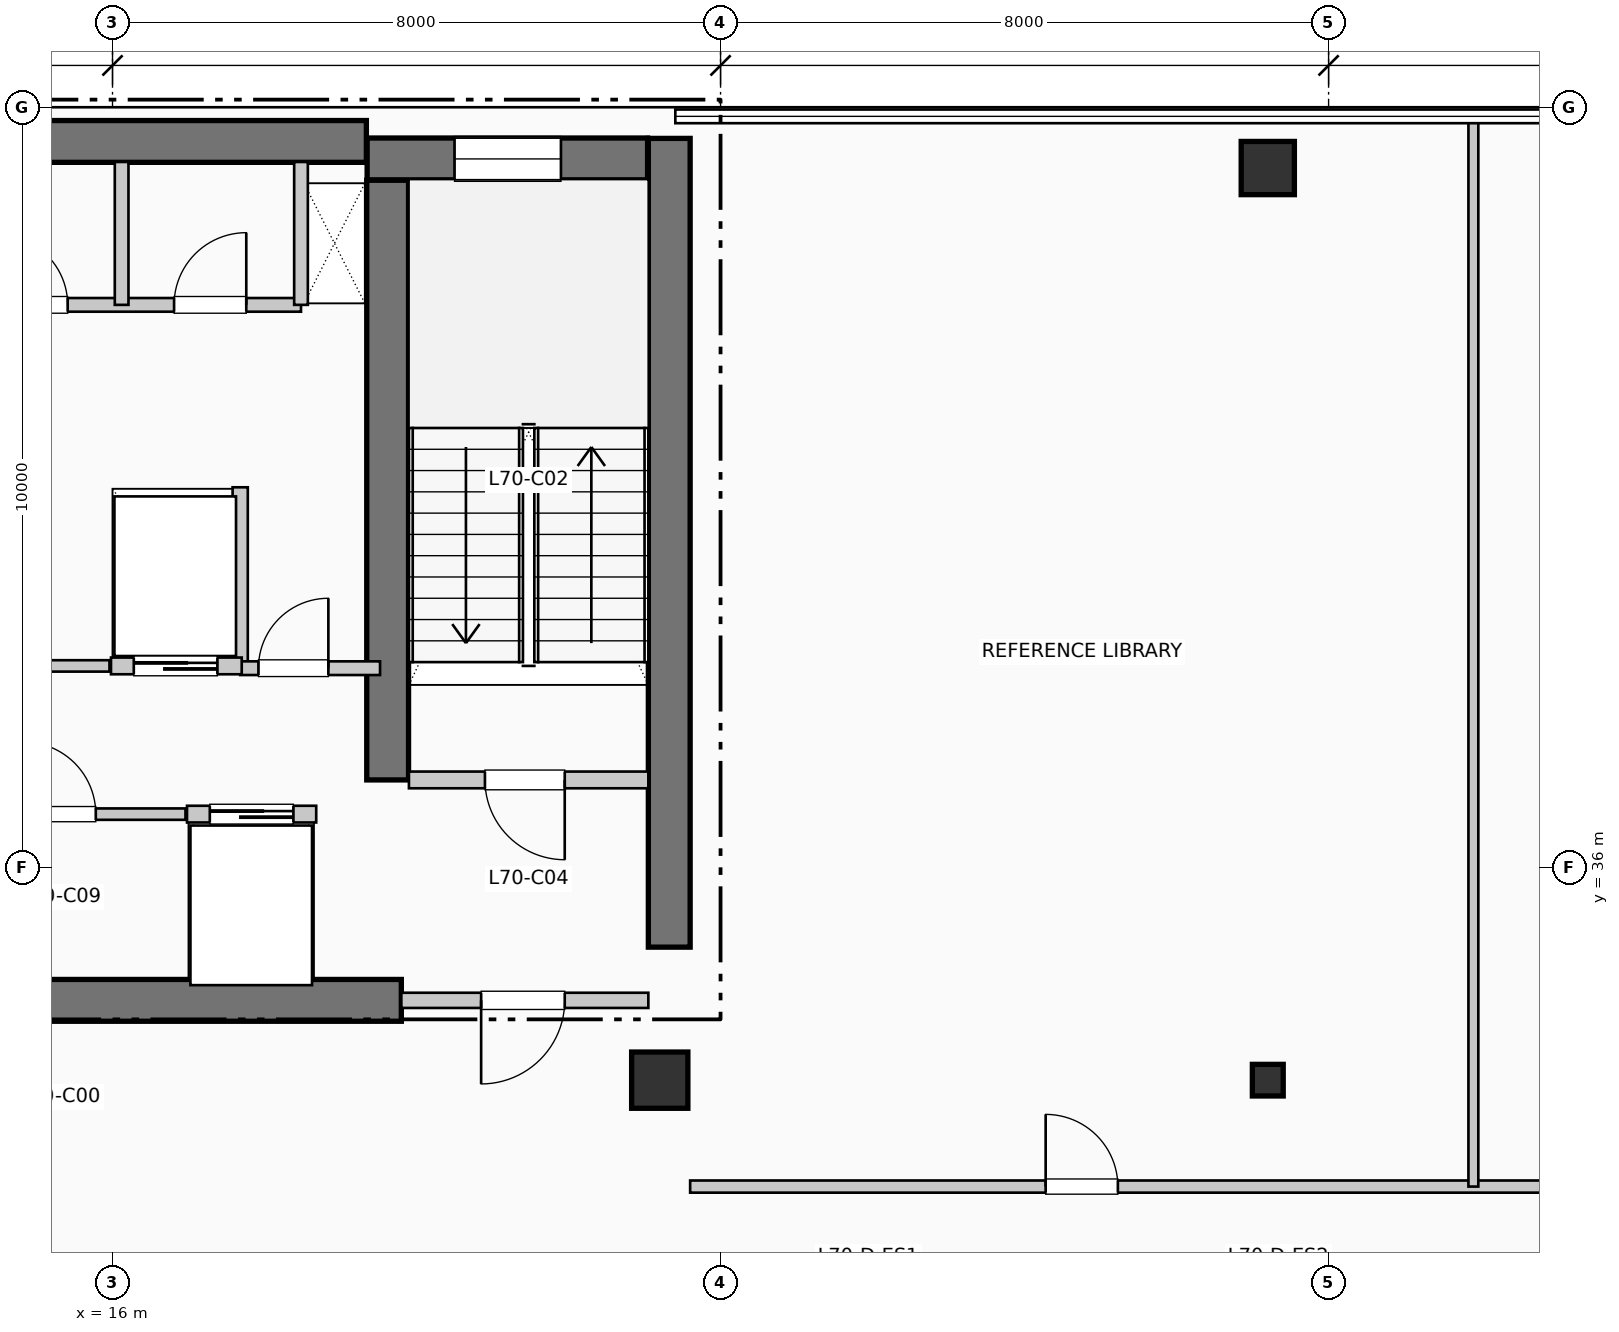
"""IFC4 building model, lengths in metres.
Left out: names, types, materials, properties, quantities, classifications, styles, units other than length and angle.
Written with IfcOpenShell. Run it as: python <this file> out.ifc"""

import sys

from ifc_helpers import new_model, si_unit, direction, frame, frame_2d, origin, origin_2d, place, context, subcontext, project, spatial, rectangle, i_section, extrude, element, fill, save


model = new_model("IFC4")
c1 = context("Model", 3, precision=1e-05, world=origin(), true_north=direction((0.0, 1.0)))
c2 = subcontext(c1, "Body", "Model", "MODEL_VIEW")
j1 = project(units=[si_unit("LENGTHUNIT", "METRE"), si_unit("PLANEANGLEUNIT", "RADIAN")], contexts=[c1])
p1 = place(None, origin())
s1 = spatial("IfcSite", under=j1, at=p1, CompositionType="ELEMENT")
p2 = place(p1, origin())
s2 = spatial("IfcBuilding", under=s1, at=p2, CompositionType="ELEMENT")
p3 = place(p2, frame((0.0, 0.0, 288.09)))
s3 = spatial("IfcBuildingStorey", under=s2, at=p3, CompositionType="ELEMENT", Elevation=288.09)
p4 = place(p3, frame((5.36, 45.55, 0.0), z_axis=(0.0, 0.0, 1.0), x_axis=(1.0, 0.0, 0.0)))
e1 = element("IfcWall", 1, at=p4, inside=s3, PredefinedType="SHEAR", context=c2, shape_type="SweptSolid", body=[
    extrude(rectangle(XDim=13.98, YDim=0.55, at=frame_2d((6.99, 0.0))), origin(), (0.0, 0.0, 1.0), 3.96),
])
p5 = place(p3, frame((23.325, 34.95, 0.0), z_axis=(0.0, 0.0, 1.0), x_axis=(0.0, 1.0, 0.0)))
e2 = element("IfcWall", 2, at=p5, inside=s3, PredefinedType="SHEAR", context=c2, shape_type="SweptSolid", body=[
    extrude(rectangle(XDim=10.64, YDim=0.55, at=frame_2d((5.32, 0.0))), origin(), (0.0, 0.0, 1.0), 3.96),
])
p6 = place(p3, frame((13.68, 34.25, 0.0), z_axis=(0.0, 0.0, 1.0), x_axis=(1.0, 0.0, 0.0)))
e3 = element("IfcWall", 3, at=p6, inside=s3, PredefinedType="SHEAR", context=c2, shape_type="SweptSolid", body=[
    extrude(rectangle(XDim=6.12, YDim=0.55, at=frame_2d((3.06, 0.0))), origin(), (0.0, 0.0, 1.0), 3.96),
])
p7 = place(p3, frame((19.62, 37.15, 0.0), z_axis=(0.0, 0.0, 1.0), x_axis=(0.0, 1.0, 0.0)))
e4 = element("IfcWall", 4, at=p7, inside=s3, PredefinedType="SHEAR", context=c2, shape_type="SweptSolid", body=[
    extrude(rectangle(XDim=7.89, YDim=0.55, at=frame_2d((3.945, 0.0))), origin(), (0.0, 0.0, 1.0), 3.96),
])
p8 = place(p3, frame((19.35, 45.32, 0.0), z_axis=(0.0, 0.0, 1.0), x_axis=(1.0, 0.0, 0.0)))
e5 = element("IfcWall", 5, at=p8, inside=s3, PredefinedType="SHEAR", context=c2, shape_type="SweptSolid", body=[
    extrude(rectangle(XDim=3.69, YDim=0.55, at=frame_2d((1.845, 0.0))), origin(), (0.0, 0.0, 1.0), 3.96),
])
p9 = place(p8, frame((1.15, 0.0, 1.05)))
e6 = element("IfcOpeningElement", 6, at=p9, cuts=e5, PredefinedType="OPENING", context=c2, shape_type="SweptSolid", body=[
    extrude(rectangle(XDim=1.4, YDim=1.8, at=frame_2d((0.7, 0.9))), frame((0.0, 0.285, 0.0), z_axis=(0.0, -1.0, 0.0), x_axis=(1.0, 0.0, 0.0)), (0.0, 0.0, 1.0), 0.57),
])
p10 = place(p3, frame((23.2, 33.2, 0.0), z_axis=(0.0, 0.0, 1.0), x_axis=(1.0, 0.0, 0.0)))
e7 = element("IfcColumn", 7, at=p10, inside=s3, PredefinedType="COLUMN", context=c2, shape_type="SweptSolid", body=[
    extrude(rectangle(XDim=0.74, YDim=0.74, at=origin_2d()), origin(), (0.0, 0.0, 1.0), 3.96),
])
p11 = place(p3, frame((31.2, 33.2, 0.0), z_axis=(0.0, 0.0, 1.0), x_axis=(1.0, 0.0, 0.0)))
e8 = element("IfcColumn", 8, at=p11, inside=s3, PredefinedType="COLUMN", context=c2, shape_type="SweptSolid", body=[
    extrude(i_section(OverallWidth=0.406, OverallDepth=0.416, WebThickness=0.022, FlangeThickness=0.036, at=origin_2d()), origin(), (0.0, 0.0, 1.0), 3.96),
])
p12 = place(p3, frame((31.2, 45.2, 0.0), z_axis=(0.0, 0.0, 1.0), x_axis=(1.0, 0.0, 0.0)))
e9 = element("IfcColumn", 9, at=p12, inside=s3, PredefinedType="COLUMN", context=c2, shape_type="SweptSolid", body=[
    extrude(rectangle(XDim=0.7, YDim=0.7, at=origin_2d()), origin(), (0.0, 0.0, 1.0), 3.96),
])
p13 = place(p3, frame((19.9, 37.15, 0.0), z_axis=(0.0, 0.0, 1.0), x_axis=(1.0, 0.0, 0.0)))
e10 = element("IfcWall", 10, at=p13, inside=s3, PredefinedType="PARTITIONING", context=c2, shape_type="SweptSolid", body=[
    extrude(rectangle(XDim=3.15, YDim=0.22, at=frame_2d((1.575, 0.0))), origin(), (0.0, 0.0, 1.0), 3.74),
])
p14 = place(p13, frame((2.05, 0.0, 0.0), z_axis=(0.0, 0.0, 1.0), x_axis=(-1.0, 0.0, 0.0)))
e11 = element("IfcOpeningElement", 11, at=p14, cuts=e10, PredefinedType="OPENING", context=c2, shape_type="SweptSolid", body=[
    extrude(rectangle(XDim=1.05, YDim=2.15, at=frame_2d((0.525, 1.075))), frame((0.0, 0.12, 0.0), z_axis=(0.0, -1.0, 0.0), x_axis=(1.0, 0.0, 0.0)), (0.0, 0.0, 1.0), 0.24),
])
p15 = place(p3, frame((19.8, 34.25, 0.0), z_axis=(0.0, 0.0, 1.0), x_axis=(1.0, 0.0, 0.0)))
e12 = element("IfcWall", 12, at=p15, inside=s3, PredefinedType="PARTITIONING", context=c2, shape_type="SweptSolid", body=[
    extrude(rectangle(XDim=3.25, YDim=0.2, at=frame_2d((1.625, 0.0))), origin(), (0.0, 0.0, 1.0), 3.74),
])
p16 = place(p15, frame((2.15, 0.0, 0.0), z_axis=(0.0, 0.0, 1.0), x_axis=(-1.0, 0.0, 0.0)))
e13 = element("IfcOpeningElement", 13, at=p16, cuts=e12, PredefinedType="OPENING", context=c2, shape_type="SweptSolid", body=[
    extrude(rectangle(XDim=1.1, YDim=2.15, at=frame_2d((0.55, 1.075))), frame((0.0, 0.11, 0.0), z_axis=(0.0, -1.0, 0.0), x_axis=(1.0, 0.0, 0.0)), (0.0, 0.0, 1.0), 0.22),
])
p17 = place(p3, frame((17.68, 38.65, 0.0), z_axis=(0.0, 0.0, 1.0), x_axis=(0.0, 1.0, 0.0)))
e14 = element("IfcWall", 14, at=p17, inside=s3, PredefinedType="PARTITIONING", context=c2, shape_type="SweptSolid", body=[
    extrude(rectangle(XDim=2.35, YDim=0.2, at=frame_2d((1.175, 0.0))), origin(), (0.0, 0.0, 1.0), 3.74),
])
p18 = place(p3, frame((17.68, 38.62, 0.0), z_axis=(0.0, 0.0, 1.0), x_axis=(1.0, 0.0, 0.0)))
e15 = element("IfcWall", 15, at=p18, inside=s3, PredefinedType="PARTITIONING", context=c2, shape_type="SweptSolid", body=[
    extrude(rectangle(XDim=1.84, YDim=0.18, at=frame_2d((0.92, 0.0))), origin(), (0.0, 0.0, 1.0), 3.74),
])
p19 = place(p18, frame((0.24, 0.0, 0.0)))
e16 = element("IfcOpeningElement", 16, at=p19, cuts=e15, PredefinedType="OPENING", context=c2, shape_type="SweptSolid", body=[
    extrude(rectangle(XDim=0.92, YDim=2.1, at=frame_2d((0.46, 1.05))), frame((0.0, 0.1, 0.0), z_axis=(0.0, -1.0, 0.0), x_axis=(1.0, 0.0, 0.0)), (0.0, 0.0, 1.0), 0.2),
])
p20 = place(p3, frame((13.68, 36.7, 0.0), z_axis=(0.0, 0.0, 1.0), x_axis=(1.0, 0.0, 0.0)))
e17 = element("IfcWall", 17, at=p20, inside=s3, PredefinedType="PARTITIONING", context=c2, shape_type="SweptSolid", body=[
    extrude(rectangle(XDim=3.28, YDim=0.15, at=frame_2d((1.64, 0.0))), origin(), (0.0, 0.0, 1.0), 3.74),
])
p21 = place(p20, frame((1.15, 0.0, 0.0)))
e18 = element("IfcOpeningElement", 18, at=p21, cuts=e17, PredefinedType="OPENING", context=c2, shape_type="SweptSolid", body=[
    extrude(rectangle(XDim=0.95, YDim=2.15, at=frame_2d((0.475, 1.075))), frame((0.0, 0.085, 0.0), z_axis=(0.0, -1.0, 0.0), x_axis=(1.0, 0.0, 0.0)), (0.0, 0.0, 1.0), 0.17),
])
p22 = place(p3, frame((12.58, 38.65, 0.0), z_axis=(0.0, 0.0, 1.0), x_axis=(1.0, 0.0, 0.0)))
e19 = element("IfcWall", 19, at=p22, inside=s3, PredefinedType="PARTITIONING", context=c2, shape_type="SweptSolid", body=[
    extrude(rectangle(XDim=3.38, YDim=0.15, at=frame_2d((1.69, 0.0))), origin(), (0.0, 0.0, 1.0), 3.74),
])
p23 = place(p22, frame((2.2, 0.0, 0.0), z_axis=(0.0, 0.0, 1.0), x_axis=(-1.0, 0.0, 0.0)))
e20 = element("IfcOpeningElement", 20, at=p23, cuts=e19, PredefinedType="OPENING", context=c2, shape_type="SweptSolid", body=[
    extrude(rectangle(XDim=1.05, YDim=2.15, at=frame_2d((0.525, 1.075))), frame((0.0, 0.085, 0.0), z_axis=(0.0, -1.0, 0.0), x_axis=(1.0, 0.0, 0.0)), (0.0, 0.0, 1.0), 0.17),
])
p24 = place(p3, frame((16.98, 36.7, 0.0), z_axis=(0.0, 0.0, 1.0), x_axis=(1.0, 0.0, 0.0)))
e21 = element("IfcWall", 21, at=p24, inside=s3, PredefinedType="PARTITIONING", context=c2, shape_type="SweptSolid", body=[
    extrude(rectangle(XDim=1.7, YDim=0.22, at=frame_2d((0.85, 0.0))), origin(), (0.0, 0.0, 1.0), 3.74),
])
p25 = place(p24, frame((0.3, 0.0, 0.0)))
e22 = element("IfcOpeningElement", 22, at=p25, cuts=e21, PredefinedType="OPENING", context=c2, shape_type="SweptSolid", body=[
    extrude(rectangle(XDim=1.1, YDim=2.2, at=frame_2d((0.55, 1.1))), frame((0.0, 0.12, 0.0), z_axis=(0.0, -1.0, 0.0), x_axis=(1.0, 0.0, 0.0)), (0.0, 0.0, 1.0), 0.24),
])
p26 = place(p3, frame((15.98, 38.65, 0.0), z_axis=(0.0, 0.0, 1.0), x_axis=(1.0, 0.0, 0.0)))
e23 = element("IfcWall", 23, at=p26, inside=s3, PredefinedType="PARTITIONING", context=c2, shape_type="SweptSolid", body=[
    extrude(rectangle(XDim=1.72, YDim=0.22, at=frame_2d((0.86, 0.0))), origin(), (0.0, 0.0, 1.0), 3.74),
])
p27 = place(p26, frame((0.3, 0.0, 0.0)))
e24 = element("IfcOpeningElement", 24, at=p27, cuts=e23, PredefinedType="OPENING", context=c2, shape_type="SweptSolid", body=[
    extrude(rectangle(XDim=1.1, YDim=2.2, at=frame_2d((0.55, 1.1))), frame((0.0, 0.12, 0.0), z_axis=(0.0, -1.0, 0.0), x_axis=(1.0, 0.0, 0.0)), (0.0, 0.0, 1.0), 0.24),
])
p28 = place(p3, frame((9.15, 43.4, 0.0), z_axis=(0.0, 0.0, 1.0), x_axis=(1.0, 0.0, 0.0)))
e25 = element("IfcWall", 25, at=p28, inside=s3, PredefinedType="PLUMBINGWALL", context=c2, shape_type="SweptSolid", body=[
    extrude(rectangle(XDim=9.33, YDim=0.18, at=frame_2d((4.665, 0.0))), origin(), (0.0, 0.0, 1.0), 3.74),
])
p29 = place(p28, frame((0.72, 0.0, 0.0)))
e26 = element("IfcOpeningElement", 26, at=p29, cuts=e25, PredefinedType="OPENING", context=c2, shape_type="SweptSolid", body=[
    extrude(rectangle(XDim=0.92, YDim=2.1, at=frame_2d((0.46, 1.05))), frame((0.0, 0.1, 0.0), z_axis=(0.0, -1.0, 0.0), x_axis=(1.0, 0.0, 0.0)), (0.0, 0.0, 1.0), 0.2),
])
p30 = place(p28, frame((3.02, 0.0, 0.0)))
e27 = element("IfcOpeningElement", 27, at=p30, cuts=e25, PredefinedType="OPENING", context=c2, shape_type="SweptSolid", body=[
    extrude(rectangle(XDim=0.92, YDim=2.1, at=frame_2d((0.46, 1.05))), frame((0.0, 0.1, 0.0), z_axis=(0.0, -1.0, 0.0), x_axis=(1.0, 0.0, 0.0)), (0.0, 0.0, 1.0), 0.2),
])
p31 = place(p28, frame((5.34, 0.0, 0.0)))
e28 = element("IfcOpeningElement", 28, at=p31, cuts=e25, PredefinedType="OPENING", context=c2, shape_type="SweptSolid", body=[
    extrude(rectangle(XDim=0.92, YDim=2.1, at=frame_2d((0.46, 1.05))), frame((0.0, 0.1, 0.0), z_axis=(0.0, -1.0, 0.0), x_axis=(1.0, 0.0, 0.0)), (0.0, 0.0, 1.0), 0.2),
])
p32 = place(p28, frame((7.66, 0.0, 0.0)))
e29 = element("IfcOpeningElement", 29, at=p32, cuts=e25, PredefinedType="OPENING", context=c2, shape_type="SweptSolid", body=[
    extrude(rectangle(XDim=0.95, YDim=2.1, at=frame_2d((0.475, 1.05))), frame((0.0, 0.1, 0.0), z_axis=(0.0, -1.0, 0.0), x_axis=(1.0, 0.0, 0.0)), (0.0, 0.0, 1.0), 0.2),
])
for number, where, z_axis, x_axis in (
    (30, (18.48, 43.4, 0.0), (0.0, 0.0, 1.0), (0.0, 1.0, 0.0)),
    (31, (16.12, 43.4, 0.0), (0.0, 0.0, 1.0), (0.0, 1.0, 0.0)),
):
    element("IfcWall", number, at=place(p3, frame(where, z_axis=z_axis, x_axis=x_axis)), inside=s3, PredefinedType="PLUMBINGWALL", context=c2, shape_type="SweptSolid", body=[
        extrude(rectangle(XDim=1.88, YDim=0.18, at=frame_2d((0.94, 0.0))), origin(), (0.0, 0.0, 1.0), 3.74),
    ])
p33 = place(p3, frame((23.6, 31.8, 0.0), z_axis=(0.0, 0.0, 1.0), x_axis=(1.0, 0.0, 0.0)))
e32 = element("IfcWall", 32, at=p33, inside=s3, PredefinedType="PARTITIONING", context=c2, shape_type="SweptSolid", body=[
    extrude(rectangle(XDim=20.61, YDim=0.16, at=frame_2d((10.305, 0.0))), origin(), (0.0, 0.0, 1.0), 3.74),
])
p34 = place(p33, frame((4.677, 0.0, 0.0)))
e33 = element("IfcOpeningElement", 33, at=p34, cuts=e32, PredefinedType="OPENING", context=c2, shape_type="SweptSolid", body=[
    extrude(rectangle(XDim=0.95, YDim=2.15, at=frame_2d((0.475, 1.075))), frame((0.0, 0.09, 0.0), z_axis=(0.0, -1.0, 0.0), x_axis=(1.0, 0.0, 0.0)), (0.0, 0.0, 1.0), 0.18),
])
p35 = place(p33, frame((14.982, 0.0, 0.0)))
e34 = element("IfcOpeningElement", 34, at=p35, cuts=e32, PredefinedType="OPENING", context=c2, shape_type="SweptSolid", body=[
    extrude(rectangle(XDim=0.95, YDim=2.15, at=frame_2d((0.475, 1.075))), frame((0.0, 0.09, 0.0), z_axis=(0.0, -1.0, 0.0), x_axis=(1.0, 0.0, 0.0)), (0.0, 0.0, 1.0), 0.18),
])
p36 = place(p3, frame((33.905, 31.8, 0.0), z_axis=(0.0, 0.0, 1.0), x_axis=(0.0, 1.0, 0.0)))
e35 = element("IfcWall", 35, at=p36, inside=s3, PredefinedType="PARTITIONING", context=c2, shape_type="SweptSolid", body=[
    extrude(rectangle(XDim=14.01, YDim=0.13, at=frame_2d((7.005, 0.0))), origin(), (0.0, 0.0, 1.0), 3.74),
])
p37 = place(p9, origin())
e36 = element("IfcWindow", 36, at=p37, inside=s3, PartitioningType="SINGLE_PANEL", PredefinedType="WINDOW", context=c2, shape_type="SweptSolid", body=[
    extrude(rectangle(XDim=1.4, YDim=1.8, at=frame_2d((0.7, 0.9))), frame((0.0, 0.03, 0.0), z_axis=(0.0, -1.0, 0.0), x_axis=(1.0, 0.0, 0.0)), (0.0, 0.0, 1.0), 0.06),
])
fill(e6, e36)
p38 = place(p14, origin())
e37 = element("IfcDoor", 37, at=p38, inside=s3, OperationType="SINGLE_SWING_RIGHT", PredefinedType="DOOR", context=c2, shape_type="SweptSolid", body=[
    extrude(rectangle(XDim=1.05, YDim=2.15, at=frame_2d((0.525, 1.075))), frame((0.0, 0.025, 0.0), z_axis=(0.0, -1.0, 0.0), x_axis=(1.0, 0.0, 0.0)), (0.0, 0.0, 1.0), 0.05),
])
fill(e11, e37)
p39 = place(p16, origin())
e38 = element("IfcDoor", 38, at=p39, inside=s3, OperationType="SINGLE_SWING_LEFT", PredefinedType="DOOR", context=c2, shape_type="SweptSolid", body=[
    extrude(rectangle(XDim=1.1, YDim=2.15, at=frame_2d((0.55, 1.075))), frame((0.0, 0.025, 0.0), z_axis=(0.0, -1.0, 0.0), x_axis=(1.0, 0.0, 0.0)), (0.0, 0.0, 1.0), 0.05),
])
fill(e13, e38)
p40 = place(p19, origin())
e39 = element("IfcDoor", 39, at=p40, inside=s3, OperationType="SINGLE_SWING_RIGHT", PredefinedType="DOOR", context=c2, shape_type="SweptSolid", body=[
    extrude(rectangle(XDim=0.92, YDim=2.1, at=frame_2d((0.46, 1.05))), frame((0.0, 0.025, 0.0), z_axis=(0.0, -1.0, 0.0), x_axis=(1.0, 0.0, 0.0)), (0.0, 0.0, 1.0), 0.05),
])
fill(e16, e39)
p41 = place(p21, origin())
e40 = element("IfcDoor", 40, at=p41, inside=s3, OperationType="SINGLE_SWING_LEFT", PredefinedType="DOOR", context=c2, shape_type="SweptSolid", body=[
    extrude(rectangle(XDim=0.95, YDim=2.15, at=frame_2d((0.475, 1.075))), frame((0.0, 0.025, 0.0), z_axis=(0.0, -1.0, 0.0), x_axis=(1.0, 0.0, 0.0)), (0.0, 0.0, 1.0), 0.05),
])
fill(e18, e40)
p42 = place(p25, origin())
e41 = element("IfcDoor", 41, at=p42, inside=s3, OperationType="SLIDING_TO_LEFT", PredefinedType="DOOR", context=c2, shape_type="SweptSolid", body=[
    extrude(rectangle(XDim=1.1, YDim=2.2, at=frame_2d((0.55, 1.1))), frame((0.0, 0.025, 0.0), z_axis=(0.0, -1.0, 0.0), x_axis=(1.0, 0.0, 0.0)), (0.0, 0.0, 1.0), 0.05),
])
fill(e22, e41)
p43 = place(p27, origin())
e42 = element("IfcDoor", 42, at=p43, inside=s3, OperationType="SLIDING_TO_LEFT", PredefinedType="DOOR", context=c2, shape_type="SweptSolid", body=[
    extrude(rectangle(XDim=1.1, YDim=2.2, at=frame_2d((0.55, 1.1))), frame((0.0, 0.025, 0.0), z_axis=(0.0, -1.0, 0.0), x_axis=(1.0, 0.0, 0.0)), (0.0, 0.0, 1.0), 0.05),
])
fill(e24, e42)
p44 = place(p31, origin())
e43 = element("IfcDoor", 43, at=p44, inside=s3, OperationType="SINGLE_SWING_LEFT", PredefinedType="DOOR", context=c2, shape_type="SweptSolid", body=[
    extrude(rectangle(XDim=0.92, YDim=2.1, at=frame_2d((0.46, 1.05))), frame((0.0, 0.025, 0.0), z_axis=(0.0, -1.0, 0.0), x_axis=(1.0, 0.0, 0.0)), (0.0, 0.0, 1.0), 0.05),
])
fill(e28, e43)
p45 = place(p32, origin())
e44 = element("IfcDoor", 44, at=p45, inside=s3, OperationType="SINGLE_SWING_RIGHT", PredefinedType="DOOR", context=c2, shape_type="SweptSolid", body=[
    extrude(rectangle(XDim=0.95, YDim=2.1, at=frame_2d((0.475, 1.05))), frame((0.0, 0.025, 0.0), z_axis=(0.0, -1.0, 0.0), x_axis=(1.0, 0.0, 0.0)), (0.0, 0.0, 1.0), 0.05),
])
fill(e29, e44)
p46 = place(p34, origin())
e45 = element("IfcDoor", 45, at=p46, inside=s3, OperationType="SINGLE_SWING_LEFT", PredefinedType="DOOR", context=c2, shape_type="SweptSolid", body=[
    extrude(rectangle(XDim=0.95, YDim=2.15, at=frame_2d((0.475, 1.075))), frame((0.0, 0.025, 0.0), z_axis=(0.0, -1.0, 0.0), x_axis=(1.0, 0.0, 0.0)), (0.0, 0.0, 1.0), 0.05),
])
fill(e33, e45)
save(model, sys.argv[1])
